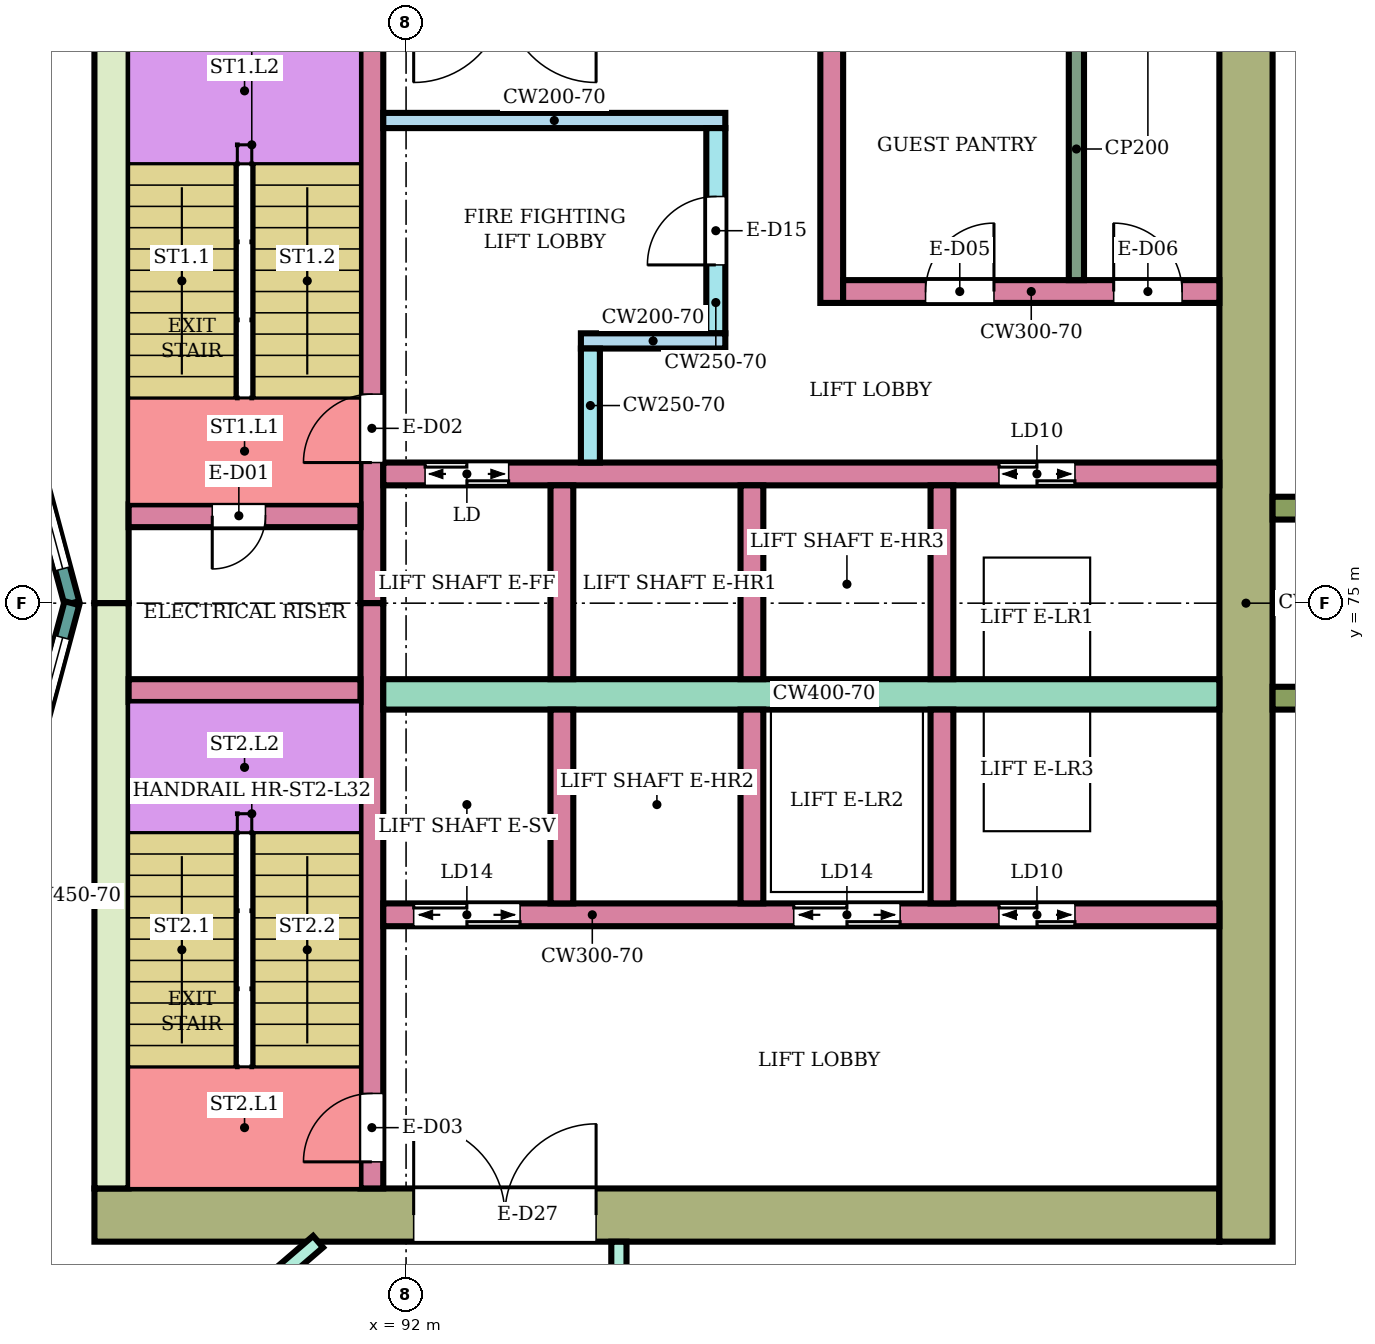
"""IFC4 building model, lengths in metres.
Left out: names, types, materials, properties, quantities, classifications, styles, units other than length and angle.
Written with IfcOpenShell. Run it as: python <this file> out.ifc"""

import sys

from ifc_helpers import new_model, si_unit, direction, frame, frame_2d, origin, place, context, subcontext, project, spatial, rectangle, extrude, element, fill, save


model = new_model("IFC4")
c1 = context("Model", 3, precision=1e-05, world=origin(), true_north=direction((0.0, 1.0)))
c2 = subcontext(c1, "Body", "Model", "MODEL_VIEW")
j1 = project(units=[si_unit("LENGTHUNIT", "METRE"), si_unit("PLANEANGLEUNIT", "RADIAN")], contexts=[c1])
p1 = place(None, origin())
s1 = spatial("IfcSite", under=j1, at=p1, CompositionType="ELEMENT")
p2 = place(p1, origin())
s2 = spatial("IfcBuilding", under=s1, at=p2, CompositionType="ELEMENT")
p3 = place(p2, frame((0.0, 0.0, 138.0)))
s3 = spatial("IfcBuildingStorey", under=s2, at=p3, CompositionType="ELEMENT", Elevation=138.0)
p4 = place(p3, frame((87.9, 66.95, 0.0), z_axis=(0.0, 0.0, 1.0), x_axis=(1.0, 0.0, 0.0)))
e1 = element("IfcWall", 1, at=p4, inside=s3, PredefinedType="SHEAR", context=c2, shape_type="SweptSolid", body=[
    extrude(rectangle(XDim=14.8, YDim=0.7, at=frame_2d((7.4, 0.0))), origin(), (0.0, 0.0, 1.0), 3.58),
])
p5 = place(p4, frame((4.2, 0.0, 0.0)))
e2 = element("IfcOpeningElement", 2, at=p5, cuts=e1, PredefinedType="OPENING", context=c2, shape_type="SweptSolid", body=[
    extrude(rectangle(XDim=2.4, YDim=2.4, at=frame_2d((1.2, 1.2))), frame((0.0, 0.36, 0.0), z_axis=(0.0, -1.0, 0.0), x_axis=(1.0, 0.0, 0.0)), (0.0, 0.0, 1.0), 0.72),
])
for number, where, z_axis, x_axis in (
    (3, (88.125, 75.0, 0.0), (0.0, 0.0, 1.0), (0.0, 1.0, 0.0)),
    (4, (88.125, 67.3, 0.0), (0.0, 0.0, 1.0), (0.0, 1.0, 0.0)),
):
    element("IfcWall", number, at=place(p3, frame(where, z_axis=z_axis, x_axis=x_axis)), inside=s3, PredefinedType="SHEAR", context=c2, shape_type="SweptSolid", body=[
        extrude(rectangle(XDim=7.7, YDim=0.45, at=frame_2d((3.85, 0.0))), origin(), (0.0, 0.0, 1.0), 3.58),
    ])
p6 = place(p3, frame((103.05, 66.6, 0.0), z_axis=(0.0, 0.0, 1.0), x_axis=(0.0, 1.0, 0.0)))
e5 = element("IfcWall", 5, at=p6, inside=s3, PredefinedType="SHEAR", context=c2, shape_type="SweptSolid", body=[
    extrude(rectangle(XDim=16.8, YDim=0.7, at=frame_2d((8.4, 0.0))), origin(), (0.0, 0.0, 1.0), 3.58),
])
p7 = place(p3, frame((91.55, 75.0, 0.0), z_axis=(0.0, 0.0, 1.0), x_axis=(0.0, 1.0, 0.0)))
e6 = element("IfcWall", 6, at=p7, inside=s3, PredefinedType="SHEAR", context=c2, shape_type="SweptSolid", body=[
    extrude(rectangle(XDim=7.7, YDim=0.3, at=frame_2d((3.85, 0.0))), origin(), (0.0, 0.0, 1.0), 3.58),
])
p8 = place(p7, frame((1.85, 0.0, 0.0)))
e7 = element("IfcOpeningElement", 7, at=p8, cuts=e6, PredefinedType="OPENING", context=c2, shape_type="SweptSolid", body=[
    extrude(rectangle(XDim=0.9, YDim=2.1, at=frame_2d((0.45, 1.05))), frame((0.0, 0.16, 0.0), z_axis=(0.0, -1.0, 0.0), x_axis=(1.0, 0.0, 0.0)), (0.0, 0.0, 1.0), 0.32),
])
p9 = place(p3, frame((91.55, 67.3, 0.0), z_axis=(0.0, 0.0, 1.0), x_axis=(0.0, 1.0, 0.0)))
e8 = element("IfcWall", 8, at=p9, inside=s3, PredefinedType="SHEAR", context=c2, shape_type="SweptSolid", body=[
    extrude(rectangle(XDim=7.7, YDim=0.3, at=frame_2d((3.85, 0.0))), origin(), (0.0, 0.0, 1.0), 3.58),
])
p10 = place(p9, frame((0.35, 0.0, 0.0)))
e9 = element("IfcOpeningElement", 9, at=p10, cuts=e8, PredefinedType="OPENING", context=c2, shape_type="SweptSolid", body=[
    extrude(rectangle(XDim=0.9, YDim=2.1, at=frame_2d((0.45, 1.05))), frame((0.0, 0.16, 0.0), z_axis=(0.0, -1.0, 0.0), x_axis=(1.0, 0.0, 0.0)), (0.0, 0.0, 1.0), 0.32),
])
p11 = place(p3, frame((88.35, 76.15, 0.0), z_axis=(0.0, 0.0, 1.0), x_axis=(1.0, 0.0, 0.0)))
e10 = element("IfcWall", 10, at=p11, inside=s3, PredefinedType="SHEAR", context=c2, shape_type="SweptSolid", body=[
    extrude(rectangle(XDim=3.05, YDim=0.3, at=frame_2d((1.525, 0.0))), origin(), (0.0, 0.0, 1.0), 3.58),
])
p12 = place(p11, frame((1.1, 0.0, 0.0)))
e11 = element("IfcOpeningElement", 11, at=p12, cuts=e10, PredefinedType="OPENING", context=c2, shape_type="SweptSolid", body=[
    extrude(rectangle(XDim=0.7, YDim=2.0, at=frame_2d((0.35, 1.0))), frame((0.0, 0.16, 0.0), z_axis=(0.0, -1.0, 0.0), x_axis=(1.0, 0.0, 0.0)), (0.0, 0.0, 1.0), 0.32),
])
p13 = place(p3, frame((88.35, 73.85, 0.0), z_axis=(0.0, 0.0, 1.0), x_axis=(1.0, 0.0, 0.0)))
e12 = element("IfcWall", 12, at=p13, inside=s3, PredefinedType="SHEAR", context=c2, shape_type="SweptSolid", body=[
    extrude(rectangle(XDim=3.05, YDim=0.3, at=frame_2d((1.525, 0.0))), origin(), (0.0, 0.0, 1.0), 3.58),
])
p14 = place(p3, frame((91.7, 76.7, 0.0), z_axis=(0.0, 0.0, 1.0), x_axis=(1.0, 0.0, 0.0)))
e13 = element("IfcWall", 13, at=p14, inside=s3, PredefinedType="SHEAR", context=c2, shape_type="SweptSolid", body=[
    extrude(rectangle(XDim=11.0, YDim=0.3, at=frame_2d((5.5, 0.0))), origin(), (0.0, 0.0, 1.0), 3.58),
])
p15 = place(p14, frame((0.55, 0.0, 0.0)))
e14 = element("IfcOpeningElement", 14, at=p15, cuts=e13, PredefinedType="OPENING", context=c2, shape_type="SweptSolid", body=[
    extrude(rectangle(XDim=1.1, YDim=2.1, at=frame_2d((0.55, 1.05))), frame((0.0, 0.16, 0.0), z_axis=(0.0, -1.0, 0.0), x_axis=(1.0, 0.0, 0.0)), (0.0, 0.0, 1.0), 0.32),
])
p16 = place(p14, frame((8.1, 0.0, 0.0)))
e15 = element("IfcOpeningElement", 15, at=p16, cuts=e13, PredefinedType="OPENING", context=c2, shape_type="SweptSolid", body=[
    extrude(rectangle(XDim=1.0, YDim=2.1, at=frame_2d((0.5, 1.05))), frame((0.0, 0.16, 0.0), z_axis=(0.0, -1.0, 0.0), x_axis=(1.0, 0.0, 0.0)), (0.0, 0.0, 1.0), 0.32),
])
p17 = place(p3, frame((91.7, 73.8, 0.0), z_axis=(0.0, 0.0, 1.0), x_axis=(1.0, 0.0, 0.0)))
e16 = element("IfcWall", 16, at=p17, inside=s3, PredefinedType="SHEAR", context=c2, shape_type="SweptSolid", body=[
    extrude(rectangle(XDim=11.0, YDim=0.4, at=frame_2d((5.5, 0.0))), origin(), (0.0, 0.0, 1.0), 3.58),
])
p18 = place(p3, frame((91.7, 70.9, 0.0), z_axis=(0.0, 0.0, 1.0), x_axis=(1.0, 0.0, 0.0)))
e17 = element("IfcWall", 17, at=p18, inside=s3, PredefinedType="SHEAR", context=c2, shape_type="SweptSolid", body=[
    extrude(rectangle(XDim=11.0, YDim=0.3, at=frame_2d((5.5, 0.0))), origin(), (0.0, 0.0, 1.0), 3.58),
])
p19 = place(p18, frame((0.4, 0.0, 0.0)))
e18 = element("IfcOpeningElement", 18, at=p19, cuts=e17, PredefinedType="OPENING", context=c2, shape_type="SweptSolid", body=[
    extrude(rectangle(XDim=1.4, YDim=2.1, at=frame_2d((0.7, 1.05))), frame((0.0, 0.16, 0.0), z_axis=(0.0, -1.0, 0.0), x_axis=(1.0, 0.0, 0.0)), (0.0, 0.0, 1.0), 0.32),
])
p20 = place(p18, frame((5.4, 0.0, 0.0)))
e19 = element("IfcOpeningElement", 19, at=p20, cuts=e17, PredefinedType="OPENING", context=c2, shape_type="SweptSolid", body=[
    extrude(rectangle(XDim=1.4, YDim=2.1, at=frame_2d((0.7, 1.05))), frame((0.0, 0.16, 0.0), z_axis=(0.0, -1.0, 0.0), x_axis=(1.0, 0.0, 0.0)), (0.0, 0.0, 1.0), 0.32),
])
p21 = place(p18, frame((8.1, 0.0, 0.0)))
e20 = element("IfcOpeningElement", 20, at=p21, cuts=e17, PredefinedType="OPENING", context=c2, shape_type="SweptSolid", body=[
    extrude(rectangle(XDim=1.0, YDim=2.1, at=frame_2d((0.5, 1.05))), frame((0.0, 0.16, 0.0), z_axis=(0.0, -1.0, 0.0), x_axis=(1.0, 0.0, 0.0)), (0.0, 0.0, 1.0), 0.32),
])
for number, where, z_axis, x_axis in (
    (21, (94.05, 74.0, 0.0), (0.0, 0.0, 1.0), (0.0, 1.0, 0.0)),
    (22, (96.55, 74.0, 0.0), (0.0, 0.0, 1.0), (0.0, 1.0, 0.0)),
    (23, (99.05, 74.0, 0.0), (0.0, 0.0, 1.0), (0.0, 1.0, 0.0)),
    (24, (94.05, 71.05, 0.0), (0.0, 0.0, 1.0), (0.0, 1.0, 0.0)),
    (25, (96.55, 71.05, 0.0), (0.0, 0.0, 1.0), (0.0, 1.0, 0.0)),
    (26, (99.05, 71.05, 0.0), (0.0, 0.0, 1.0), (0.0, 1.0, 0.0)),
):
    element("IfcWall", number, at=place(p3, frame(where, z_axis=z_axis, x_axis=x_axis)), inside=s3, PredefinedType="SHEAR", context=c2, shape_type="SweptSolid", body=[
        extrude(rectangle(XDim=2.55, YDim=0.3, at=frame_2d((1.275, 0.0))), origin(), (0.0, 0.0, 1.0), 3.58),
    ])
p22 = place(p3, frame((91.7, 81.35, 0.0), z_axis=(0.0, 0.0, 1.0), x_axis=(1.0, 0.0, 0.0)))
e27 = element("IfcWall", 27, at=p22, inside=s3, PredefinedType="SHEAR", context=c2, shape_type="SweptSolid", body=[
    extrude(rectangle(XDim=4.5, YDim=0.2, at=frame_2d((2.25, 0.0))), origin(), (0.0, 0.0, 1.0), 3.58),
])
p23 = place(p3, frame((96.075, 78.55, 0.0), z_axis=(0.0, 0.0, 1.0), x_axis=(0.0, 1.0, 0.0)))
e28 = element("IfcWall", 28, at=p23, inside=s3, PredefinedType="SHEAR", context=c2, shape_type="SweptSolid", body=[
    extrude(rectangle(XDim=2.7, YDim=0.25, at=frame_2d((1.35, 0.0))), origin(), (0.0, 0.0, 1.0), 3.58),
])
p24 = place(p23, frame((0.9, 0.0, 0.0)))
e29 = element("IfcOpeningElement", 29, at=p24, cuts=e28, PredefinedType="OPENING", context=c2, shape_type="SweptSolid", body=[
    extrude(rectangle(XDim=0.9, YDim=2.1, at=frame_2d((0.45, 1.05))), frame((0.0, 0.135, 0.0), z_axis=(0.0, -1.0, 0.0), x_axis=(1.0, 0.0, 0.0)), (0.0, 0.0, 1.0), 0.27),
])
p25 = place(p3, frame((94.3, 78.45, 0.0), z_axis=(0.0, 0.0, 1.0), x_axis=(1.0, 0.0, 0.0)))
e30 = element("IfcWall", 30, at=p25, inside=s3, PredefinedType="SHEAR", context=c2, shape_type="SweptSolid", body=[
    extrude(rectangle(XDim=1.9, YDim=0.2, at=frame_2d((0.95, 0.0))), origin(), (0.0, 0.0, 1.0), 3.58),
])
p26 = place(p3, frame((94.425, 76.85, 0.0), z_axis=(0.0, 0.0, 1.0), x_axis=(0.0, 1.0, 0.0)))
e31 = element("IfcWall", 31, at=p26, inside=s3, PredefinedType="SHEAR", context=c2, shape_type="SweptSolid", body=[
    extrude(rectangle(XDim=1.5, YDim=0.25, at=frame_2d((0.75, 0.0))), origin(), (0.0, 0.0, 1.0), 3.58),
])
p27 = place(p3, frame((97.6, 78.95, 0.0), z_axis=(0.0, 0.0, 1.0), x_axis=(0.0, 1.0, 0.0)))
e32 = element("IfcWall", 32, at=p27, inside=s3, PredefinedType="SHEAR", context=c2, shape_type="SweptSolid", body=[
    extrude(rectangle(XDim=3.75, YDim=0.3, at=frame_2d((1.875, 0.0))), origin(), (0.0, 0.0, 1.0), 3.58),
])
p28 = place(p3, frame((97.75, 79.1, 0.0), z_axis=(0.0, 0.0, 1.0), x_axis=(1.0, 0.0, 0.0)))
e33 = element("IfcWall", 33, at=p28, inside=s3, PredefinedType="SHEAR", context=c2, shape_type="SweptSolid", body=[
    extrude(rectangle(XDim=4.95, YDim=0.3, at=frame_2d((2.475, 0.0))), origin(), (0.0, 0.0, 1.0), 3.58),
])
p29 = place(p28, frame((1.084, 0.0, 0.0)))
e34 = element("IfcOpeningElement", 34, at=p29, cuts=e33, PredefinedType="OPENING", context=c2, shape_type="SweptSolid", body=[
    extrude(rectangle(XDim=0.9, YDim=2.1, at=frame_2d((0.45, 1.05))), frame((0.0, 0.16, 0.0), z_axis=(0.0, -1.0, 0.0), x_axis=(1.0, 0.0, 0.0)), (0.0, 0.0, 1.0), 0.32),
])
p30 = place(p28, frame((3.56, 0.0, 0.0)))
e35 = element("IfcOpeningElement", 35, at=p30, cuts=e33, PredefinedType="OPENING", context=c2, shape_type="SweptSolid", body=[
    extrude(rectangle(XDim=0.9, YDim=2.1, at=frame_2d((0.45, 1.05))), frame((0.0, 0.16, 0.0), z_axis=(0.0, -1.0, 0.0), x_axis=(1.0, 0.0, 0.0)), (0.0, 0.0, 1.0), 0.32),
])
for number, where, z_axis, x_axis in (
    (36, (103.4, 73.75, 0.0), (0.0, 0.0, 1.0), (1.0, 0.0, 0.0)),
    (37, (103.4, 76.25, 0.0), (0.0, 0.0, 1.0), (1.0, 0.0, 0.0)),
):
    element("IfcWall", number, at=place(p3, frame(where, z_axis=z_axis, x_axis=x_axis)), inside=s3, PredefinedType="NOTDEFINED", context=c2, shape_type="SweptSolid", body=[
        extrude(rectangle(XDim=2.416, YDim=0.3, at=frame_2d((1.208, 0.0))), origin(), (0.0, 0.0, 1.0), 3.9),
    ])
p31 = place(p3, frame((87.604, 75.0, 0.0), z_axis=(0.0, 0.0, 1.0), x_axis=(-0.258789828301, 0.965933654434, 0.0)))
e38 = element("IfcWall", 38, at=p31, inside=s3, PredefinedType="NOTDEFINED", context=c2, shape_type="SweptSolid", body=[
    extrude(rectangle(XDim=3.936, YDim=0.2, at=frame_2d((1.968, 0.0))), origin(), (0.0, 0.0, 1.0), 3.9),
])
p32 = place(p31, frame((0.468, 0.0, 0.9)))
e39 = element("IfcOpeningElement", 39, at=p32, cuts=e38, PredefinedType="OPENING", context=c2, shape_type="SweptSolid", body=[
    extrude(rectangle(XDim=3.0, YDim=2.3, at=frame_2d((1.5, 1.15))), frame((0.0, 0.11, 0.0), z_axis=(0.0, -1.0, 0.0), x_axis=(1.0, 0.0, 0.0)), (0.0, 0.0, 1.0), 0.22),
])
p33 = place(p3, frame((86.585, 71.198, 0.0), z_axis=(0.0, 0.0, 1.0), x_axis=(0.258789828301, 0.965933654434, 0.0)))
e40 = element("IfcWall", 40, at=p33, inside=s3, PredefinedType="NOTDEFINED", context=c2, shape_type="SweptSolid", body=[
    extrude(rectangle(XDim=3.936, YDim=0.2, at=frame_2d((1.968, 0.0))), origin(), (0.0, 0.0, 1.0), 3.9),
])
p34 = place(p33, frame((0.468, 0.0, 0.9)))
e41 = element("IfcOpeningElement", 41, at=p34, cuts=e40, PredefinedType="OPENING", context=c2, shape_type="SweptSolid", body=[
    extrude(rectangle(XDim=3.0, YDim=2.3, at=frame_2d((1.5, 1.15))), frame((0.0, 0.11, 0.0), z_axis=(0.0, -1.0, 0.0), x_axis=(1.0, 0.0, 0.0)), (0.0, 0.0, 1.0), 0.22),
])
p35 = place(p3, frame((86.877, 63.189, 0.0), z_axis=(0.0, 0.0, 1.0), x_axis=(0.758164888471, 0.652062881853, 0.0)))
e42 = element("IfcWall", 42, at=p35, inside=s3, PredefinedType="PARTITIONING", context=c2, shape_type="SweptSolid", body=[
    extrude(rectangle(XDim=5.23, YDim=0.2, at=frame_2d((2.615, 0.0))), origin(), (0.0, 0.0, 1.0), 3.45),
])
p36 = place(p35, frame((2.63, 0.0, 0.0)))
e43 = element("IfcOpeningElement", 43, at=p36, cuts=e42, PredefinedType="OPENING", context=c2, shape_type="SweptSolid", body=[
    extrude(rectangle(XDim=1.0, YDim=2.1, at=frame_2d((0.5, 1.05))), frame((0.0, 0.11, 0.0), z_axis=(0.0, -1.0, 0.0), x_axis=(1.0, 0.0, 0.0)), (0.0, 0.0, 1.0), 0.22),
])
p37 = place(p3, frame((94.8, 65.1, 0.0), z_axis=(0.0, 0.0, 1.0), x_axis=(0.0, 1.0, 0.0)))
e44 = element("IfcWall", 44, at=p37, inside=s3, PredefinedType="PARTITIONING", context=c2, shape_type="SweptSolid", body=[
    extrude(rectangle(XDim=1.499, YDim=0.2, at=frame_2d((0.75, 0.0))), origin(), (0.0, 0.0, 1.0), 3.45),
])
p38 = place(p3, frame((86.643, 66.681, 0.0), z_axis=(0.0, 0.0, 1.0), x_axis=(0.652264876065, -0.757991115682, 0.0)))
e45 = element("IfcWall", 45, at=p38, inside=s3, PredefinedType="PARTITIONING", context=c2, shape_type="SweptSolid", body=[
    extrude(rectangle(XDim=2.699, YDim=0.1, at=frame_2d((1.35, 0.0))), origin(), (0.0, 0.0, 1.0), 3.45),
])
p39 = place(p38, frame((1.3, 0.0, 0.0)))
e46 = element("IfcOpeningElement", 46, at=p39, cuts=e45, PredefinedType="OPENING", context=c2, shape_type="SweptSolid", body=[
    extrude(rectangle(XDim=0.8, YDim=2.1, at=frame_2d((0.4, 1.05))), frame((0.0, 0.06, 0.0), z_axis=(0.0, -1.0, 0.0), x_axis=(1.0, 0.0, 0.0)), (0.0, 0.0, 1.0), 0.12),
])
p40 = place(p3, frame((100.819, 79.25, 0.0), z_axis=(0.0, 0.0, 1.0), x_axis=(0.0, 1.0, 0.0)))
e47 = element("IfcWall", 47, at=p40, inside=s3, PredefinedType="PARTITIONING", context=c2, shape_type="SweptSolid", body=[
    extrude(rectangle(XDim=3.45, YDim=0.2, at=frame_2d((1.725, 0.0))), origin(), (0.0, 0.0, 1.0), 3.58),
])
p41 = place(p32, origin())
e48 = element("IfcWindow", 48, at=p41, inside=s3, PartitioningType="SINGLE_PANEL", PredefinedType="WINDOW", context=c2, shape_type="SweptSolid", body=[
    extrude(rectangle(XDim=3.0, YDim=2.3, at=frame_2d((1.5, 1.15))), frame((0.0, 0.03, 0.0), z_axis=(0.0, -1.0, 0.0), x_axis=(1.0, 0.0, 0.0)), (0.0, 0.0, 1.0), 0.06),
])
fill(e39, e48)
p42 = place(p34, origin())
e49 = element("IfcWindow", 49, at=p42, inside=s3, PartitioningType="SINGLE_PANEL", PredefinedType="WINDOW", context=c2, shape_type="SweptSolid", body=[
    extrude(rectangle(XDim=3.0, YDim=2.3, at=frame_2d((1.5, 1.15))), frame((0.0, 0.03, 0.0), z_axis=(0.0, -1.0, 0.0), x_axis=(1.0, 0.0, 0.0)), (0.0, 0.0, 1.0), 0.06),
])
fill(e41, e49)
p43 = place(p12, frame((0.7, 0.0, 0.0), z_axis=(0.0, 0.0, 1.0), x_axis=(-1.0, 0.0, 0.0)))
e50 = element("IfcDoor", 50, at=p43, inside=s3, OperationType="SINGLE_SWING_RIGHT", PredefinedType="DOOR", context=c2, shape_type="SweptSolid", body=[
    extrude(rectangle(XDim=0.7, YDim=2.0, at=frame_2d((0.35, 1.0))), frame((0.0, 0.025, 0.0), z_axis=(0.0, -1.0, 0.0), x_axis=(1.0, 0.0, 0.0)), (0.0, 0.0, 1.0), 0.05),
])
fill(e11, e50)
p44 = place(p8, origin())
e51 = element("IfcDoor", 51, at=p44, inside=s3, OperationType="SINGLE_SWING_LEFT", PredefinedType="DOOR", context=c2, shape_type="SweptSolid", body=[
    extrude(rectangle(XDim=0.9, YDim=2.1, at=frame_2d((0.45, 1.05))), frame((0.0, 0.025, 0.0), z_axis=(0.0, -1.0, 0.0), x_axis=(1.0, 0.0, 0.0)), (0.0, 0.0, 1.0), 0.05),
])
fill(e7, e51)
p45 = place(p10, origin())
e52 = element("IfcDoor", 52, at=p45, inside=s3, OperationType="SINGLE_SWING_LEFT", PredefinedType="DOOR", context=c2, shape_type="SweptSolid", body=[
    extrude(rectangle(XDim=0.9, YDim=2.1, at=frame_2d((0.45, 1.05))), frame((0.0, 0.025, 0.0), z_axis=(0.0, -1.0, 0.0), x_axis=(1.0, 0.0, 0.0)), (0.0, 0.0, 1.0), 0.05),
])
fill(e9, e52)
p46 = place(p15, origin())
e53 = element("IfcDoor", 53, at=p46, inside=s3, OperationType="DOUBLE_DOOR_SLIDING", PredefinedType="DOOR", context=c2, shape_type="SweptSolid", body=[
    extrude(rectangle(XDim=1.1, YDim=2.1, at=frame_2d((0.55, 1.05))), frame((0.0, 0.025, 0.0), z_axis=(0.0, -1.0, 0.0), x_axis=(1.0, 0.0, 0.0)), (0.0, 0.0, 1.0), 0.05),
])
fill(e14, e53)
p47 = place(p16, origin())
e54 = element("IfcDoor", 54, at=p47, inside=s3, OperationType="DOUBLE_DOOR_SLIDING", PredefinedType="DOOR", context=c2, shape_type="SweptSolid", body=[
    extrude(rectangle(XDim=1.0, YDim=2.1, at=frame_2d((0.5, 1.05))), frame((0.0, 0.025, 0.0), z_axis=(0.0, -1.0, 0.0), x_axis=(1.0, 0.0, 0.0)), (0.0, 0.0, 1.0), 0.05),
])
fill(e15, e54)
p48 = place(p19, origin())
e55 = element("IfcDoor", 55, at=p48, inside=s3, OperationType="DOUBLE_DOOR_SLIDING", PredefinedType="DOOR", context=c2, shape_type="SweptSolid", body=[
    extrude(rectangle(XDim=1.4, YDim=2.1, at=frame_2d((0.7, 1.05))), frame((0.0, 0.025, 0.0), z_axis=(0.0, -1.0, 0.0), x_axis=(1.0, 0.0, 0.0)), (0.0, 0.0, 1.0), 0.05),
])
fill(e18, e55)
p49 = place(p20, origin())
e56 = element("IfcDoor", 56, at=p49, inside=s3, OperationType="DOUBLE_DOOR_SLIDING", PredefinedType="DOOR", context=c2, shape_type="SweptSolid", body=[
    extrude(rectangle(XDim=1.4, YDim=2.1, at=frame_2d((0.7, 1.05))), frame((0.0, 0.025, 0.0), z_axis=(0.0, -1.0, 0.0), x_axis=(1.0, 0.0, 0.0)), (0.0, 0.0, 1.0), 0.05),
])
fill(e19, e56)
p50 = place(p21, origin())
e57 = element("IfcDoor", 57, at=p50, inside=s3, OperationType="DOUBLE_DOOR_SLIDING", PredefinedType="DOOR", context=c2, shape_type="SweptSolid", body=[
    extrude(rectangle(XDim=1.0, YDim=2.1, at=frame_2d((0.5, 1.05))), frame((0.0, 0.025, 0.0), z_axis=(0.0, -1.0, 0.0), x_axis=(1.0, 0.0, 0.0)), (0.0, 0.0, 1.0), 0.05),
])
fill(e20, e57)
p51 = place(p24, origin())
e58 = element("IfcDoor", 58, at=p51, inside=s3, OperationType="SINGLE_SWING_LEFT", PredefinedType="DOOR", context=c2, shape_type="SweptSolid", body=[
    extrude(rectangle(XDim=0.9, YDim=2.1, at=frame_2d((0.45, 1.05))), frame((0.0, 0.025, 0.0), z_axis=(0.0, -1.0, 0.0), x_axis=(1.0, 0.0, 0.0)), (0.0, 0.0, 1.0), 0.05),
])
fill(e29, e58)
p52 = place(p29, origin())
e59 = element("IfcDoor", 59, at=p52, inside=s3, OperationType="SINGLE_SWING_RIGHT", PredefinedType="DOOR", context=c2, shape_type="SweptSolid", body=[
    extrude(rectangle(XDim=0.9, YDim=2.1, at=frame_2d((0.45, 1.05))), frame((0.0, 0.025, 0.0), z_axis=(0.0, -1.0, 0.0), x_axis=(1.0, 0.0, 0.0)), (0.0, 0.0, 1.0), 0.05),
])
fill(e34, e59)
p53 = place(p30, origin())
e60 = element("IfcDoor", 60, at=p53, inside=s3, OperationType="SINGLE_SWING_LEFT", PredefinedType="DOOR", context=c2, shape_type="SweptSolid", body=[
    extrude(rectangle(XDim=0.9, YDim=2.1, at=frame_2d((0.45, 1.05))), frame((0.0, 0.025, 0.0), z_axis=(0.0, -1.0, 0.0), x_axis=(1.0, 0.0, 0.0)), (0.0, 0.0, 1.0), 0.05),
])
fill(e35, e60)
p54 = place(p5, origin())
e61 = element("IfcDoor", 61, at=p54, inside=s3, OperationType="DOUBLE_DOOR_SINGLE_SWING", PredefinedType="DOOR", context=c2, shape_type="SweptSolid", body=[
    extrude(rectangle(XDim=2.4, YDim=2.4, at=frame_2d((1.2, 1.2))), frame((0.0, 0.025, 0.0), z_axis=(0.0, -1.0, 0.0), x_axis=(1.0, 0.0, 0.0)), (0.0, 0.0, 1.0), 0.05),
])
fill(e2, e61)
save(model, sys.argv[1])
